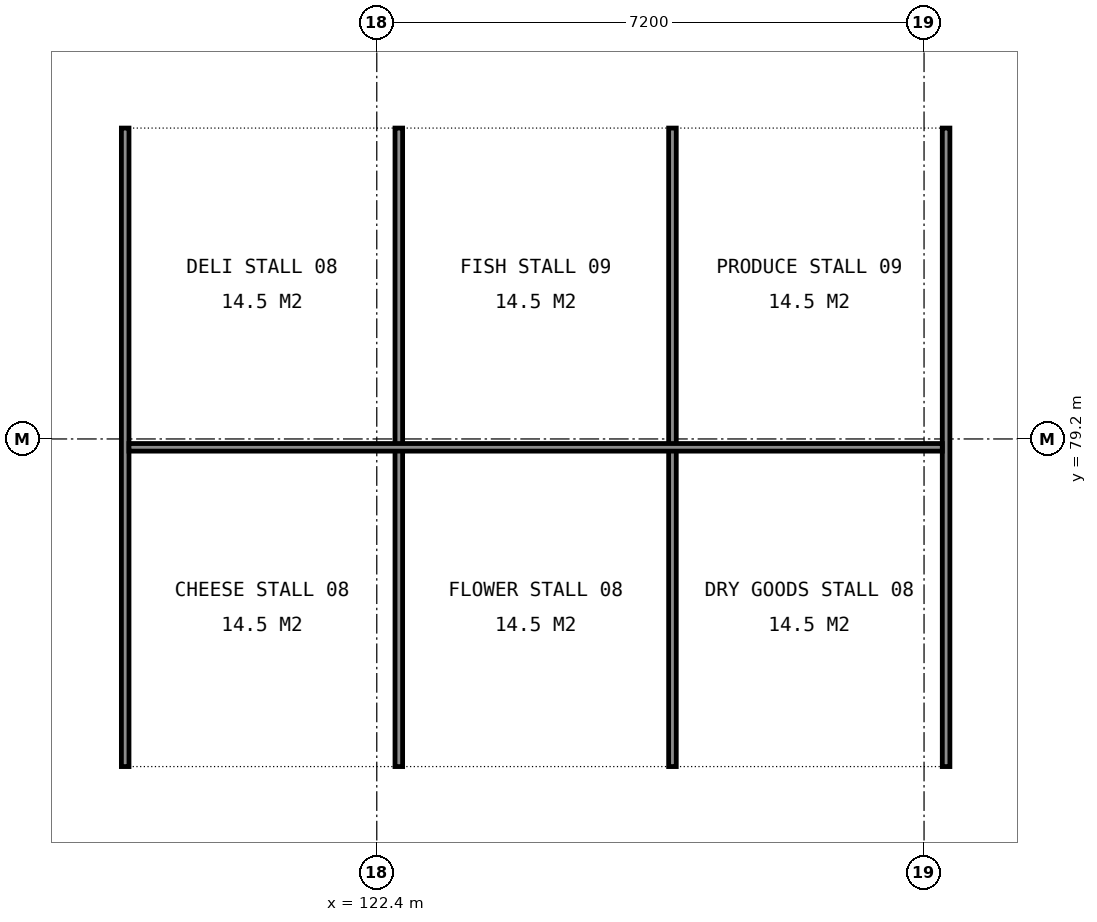
"""IFC4 building model, lengths in metres.
Left out: names, types, materials, properties, quantities, classifications, styles, units other than length and angle.
Written with IfcOpenShell. Run it as: python <this file> out.ifc"""

import sys

from ifc_helpers import new_model, si_unit, direction, frame, frame_2d, origin, place, context, subcontext, project, spatial, rectangle, extrude, element, save


model = new_model("IFC4")
c1 = context("Model", 3, precision=1e-05, world=origin(), true_north=direction((0.0, 1.0)))
c2 = subcontext(c1, "Body", "Model", "MODEL_VIEW")
j1 = project(units=[si_unit("LENGTHUNIT", "METRE"), si_unit("PLANEANGLEUNIT", "RADIAN")], contexts=[c1])
p1 = place(None, origin())
s1 = spatial("IfcSite", under=j1, at=p1, CompositionType="ELEMENT")
p2 = place(p1, origin())
s2 = spatial("IfcBuilding", under=s1, at=p2, CompositionType="ELEMENT")
p3 = place(p2, origin())
s3 = spatial("IfcBuildingStorey", under=s2, at=p3, CompositionType="ELEMENT", Elevation=0.0)
for number, where, z_axis, x_axis in (
    (1, (119.09, 74.89, 0.0), (0.0, 0.0, 1.0), (0.0, 1.0, 0.0)),
    (2, (122.69, 74.89, 0.0), (0.0, 0.0, 1.0), (0.0, 1.0, 0.0)),
    (3, (126.29, 74.89, 0.0), (0.0, 0.0, 1.0), (0.0, 1.0, 0.0)),
    (4, (129.89, 74.89, 0.0), (0.0, 0.0, 1.0), (0.0, 1.0, 0.0)),
):
    element("IfcWall", number, at=place(p3, frame(where, z_axis=z_axis, x_axis=x_axis)), inside=s3, PredefinedType="PARTITIONING", context=c2, shape_type="SweptSolid", body=[
        extrude(rectangle(XDim=8.4, YDim=0.1, at=frame_2d((4.2, 0.0))), origin(), (0.0, 0.0, 1.0), 1.2),
    ])
p4 = place(p3, frame((119.14, 79.09, 0.0), z_axis=(0.0, 0.0, 1.0), x_axis=(1.0, 0.0, 0.0)))
e5 = element("IfcWall", 5, at=p4, inside=s3, PredefinedType="PARTITIONING", context=c2, shape_type="SweptSolid", body=[
    extrude(rectangle(XDim=10.7, YDim=0.1, at=frame_2d((5.35, 0.0))), origin(), (0.0, 0.0, 1.0), 1.2),
])
save(model, sys.argv[1])
